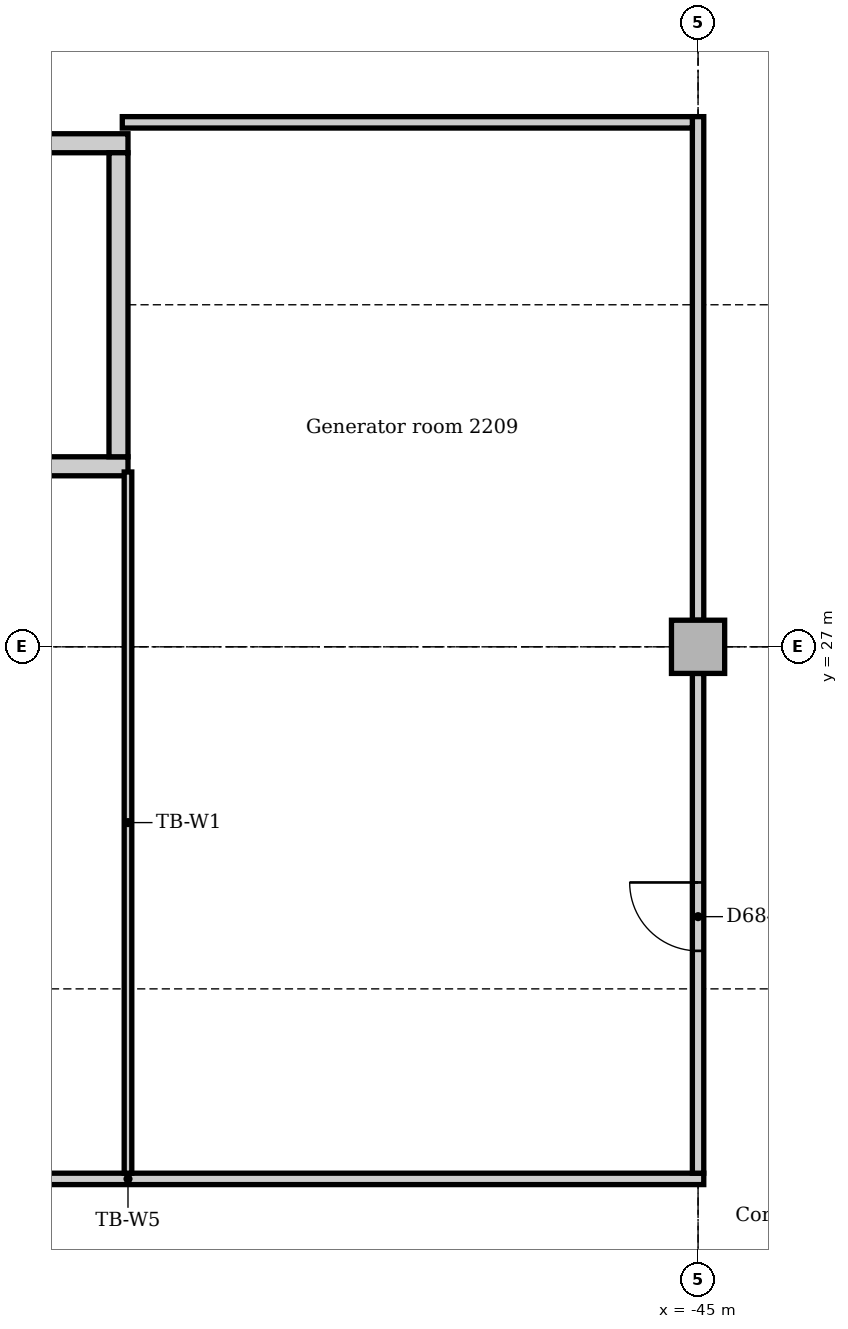
"""IFC4 building model, lengths in metres.
Left out: names, types, materials, properties, quantities, classifications, styles, units other than length and angle.
Written with IfcOpenShell. Run it as: python <this file> out.ifc"""

import sys

from ifc_helpers import new_model, si_unit, direction, frame, frame_2d, origin, origin_2d, place, context, subcontext, project, spatial, rectangle, extrude, element, fill, save


model = new_model("IFC4")
c1 = context("Model", 3, precision=1e-05, world=origin(), true_north=direction((0.0, 1.0)))
c2 = subcontext(c1, "Body", "Model", "MODEL_VIEW")
j1 = project(units=[si_unit("LENGTHUNIT", "METRE"), si_unit("PLANEANGLEUNIT", "RADIAN")], contexts=[c1])
p1 = place(None, origin())
s1 = spatial("IfcSite", under=j1, at=p1, CompositionType="ELEMENT")
p2 = place(p1, origin())
s2 = spatial("IfcBuilding", under=s1, at=p2, CompositionType="ELEMENT")
p3 = place(p2, frame((0.0, 0.0, 95.0)))
s3 = spatial("IfcBuildingStorey", under=s2, at=p3, CompositionType="ELEMENT", Elevation=95.0)
p4 = place(p3, frame((-60.0, 29.375, 0.0), z_axis=(0.0, 0.0, 1.0), x_axis=(1.0, 0.0, 0.0)))
e1 = element("IfcWall", 1, at=p4, inside=s3, PredefinedType="SOLIDWALL", context=c2, shape_type="SweptSolid", body=[
    extrude(rectangle(XDim=7.5, YDim=0.25, at=frame_2d((3.75, 0.0))), origin(), (0.0, 0.0, 1.0), 5.0),
])
p5 = place(p3, frame((-52.5, 33.625, 0.0), z_axis=(0.0, 0.0, 1.0), x_axis=(-1.0, 0.0, 0.0)))
e2 = element("IfcWall", 2, at=p5, inside=s3, PredefinedType="SOLIDWALL", context=c2, shape_type="SweptSolid", body=[
    extrude(rectangle(XDim=7.5, YDim=0.25, at=frame_2d((3.75, 0.0))), origin(), (0.0, 0.0, 1.0), 5.0),
])
p6 = place(p5, frame((6.0, 0.0, 0.0)))
e3 = element("IfcOpeningElement", 3, at=p6, cuts=e2, PredefinedType="OPENING", context=c2, shape_type="SweptSolid", body=[
    extrude(rectangle(XDim=1.0, YDim=2.1, at=frame_2d((0.5, 1.05))), frame((0.0, 0.135, 0.0), z_axis=(0.0, -1.0, 0.0), x_axis=(1.0, 0.0, 0.0)), (0.0, 0.0, 1.0), 0.27),
])
p7 = place(p3, frame((-52.625, 29.5, 0.0), z_axis=(0.0, 0.0, 1.0), x_axis=(0.0, 1.0, 0.0)))
e4 = element("IfcWall", 4, at=p7, inside=s3, PredefinedType="SOLIDWALL", context=c2, shape_type="SweptSolid", body=[
    extrude(rectangle(XDim=4.0, YDim=0.25, at=frame_2d((2.0, 0.0))), origin(), (0.0, 0.0, 1.0), 5.0),
])
p8 = place(p3, frame((-45.0, 27.0, 0.0), z_axis=(0.0, 0.0, 1.0), x_axis=(1.0, 0.0, 0.0)))
e5 = element("IfcColumn", 5, at=p8, inside=s3, PredefinedType="COLUMN", context=c2, shape_type="SweptSolid", body=[
    extrude(rectangle(XDim=0.7, YDim=0.7, at=origin_2d()), origin(), (0.0, 0.0, 1.0), 4.85),
])
p9 = place(p3, frame((-60.075, 20.0, 0.0), z_axis=(0.0, 0.0, 1.0), x_axis=(1.0, 0.0, 0.0)))
e6 = element("IfcWall", 6, at=p9, inside=s3, PredefinedType="PARTITIONING", context=c2, shape_type="SweptSolid", body=[
    extrude(rectangle(XDim=15.15, YDim=0.15, at=frame_2d((7.575, 0.0))), origin(), (0.0, 0.0, 1.0), 4.85),
])
p10 = place(p9, frame((3.4, 0.0, 0.0)))
e7 = element("IfcOpeningElement", 7, at=p10, cuts=e6, PredefinedType="OPENING", context=c2, shape_type="SweptSolid", body=[
    extrude(rectangle(XDim=0.9, YDim=2.1, at=frame_2d((0.45, 1.05))), frame((0.0, 0.085, 0.0), z_axis=(0.0, -1.0, 0.0), x_axis=(1.0, 0.0, 0.0)), (0.0, 0.0, 1.0), 0.17),
])
p11 = place(p3, frame((-45.0, 20.075, 0.0), z_axis=(0.0, 0.0, 1.0), x_axis=(0.0, 1.0, 0.0)))
e8 = element("IfcWall", 8, at=p11, inside=s3, PredefinedType="PARTITIONING", context=c2, shape_type="SweptSolid", body=[
    extrude(rectangle(XDim=6.575, YDim=0.15, at=frame_2d((3.288, 0.0))), origin(), (0.0, 0.0, 1.0), 4.362),
])
p12 = place(p11, frame((2.925, 0.0, 0.0)))
e9 = element("IfcOpeningElement", 9, at=p12, cuts=e8, PredefinedType="OPENING", context=c2, shape_type="SweptSolid", body=[
    extrude(rectangle(XDim=0.9, YDim=2.1, at=frame_2d((0.45, 1.05))), frame((0.0, 0.085, 0.0), z_axis=(0.0, -1.0, 0.0), x_axis=(1.0, 0.0, 0.0)), (0.0, 0.0, 1.0), 0.17),
])
p13 = place(p3, frame((-45.0, 27.35, 0.0), z_axis=(0.0, 0.0, 1.0), x_axis=(0.0, 1.0, 0.0)))
e10 = element("IfcWall", 10, at=p13, inside=s3, PredefinedType="PARTITIONING", context=c2, shape_type="SweptSolid", body=[
    extrude(rectangle(XDim=6.625, YDim=0.15, at=frame_2d((3.312, 0.0))), origin(), (0.0, 0.0, 1.0), 4.362),
])
p14 = place(p3, frame((-52.575, 33.9, 0.0), z_axis=(0.0, 0.0, 1.0), x_axis=(1.0, 0.0, 0.0)))
e11 = element("IfcWall", 11, at=p14, inside=s3, PredefinedType="PARTITIONING", context=c2, shape_type="SweptSolid", body=[
    extrude(rectangle(XDim=7.5, YDim=0.15, at=frame_2d((3.75, 0.0))), origin(), (0.0, 0.0, 1.0), 4.85),
])
p15 = place(p3, frame((-52.5, 20.075, 0.0), z_axis=(0.0, 0.0, 1.0), x_axis=(0.0, 1.0, 0.0)))
e12 = element("IfcWall", 12, at=p15, inside=s3, PredefinedType="PARTITIONING", context=c2, shape_type="SweptSolid", body=[
    extrude(rectangle(XDim=9.225, YDim=0.1, at=frame_2d((4.612, 0.0))), origin(), (0.0, 0.0, 1.0), 4.85),
])
p16 = place(p12, origin())
e13 = element("IfcDoor", 13, at=p16, inside=s3, OperationType="SINGLE_SWING_RIGHT", PredefinedType="DOOR", context=c2, shape_type="SweptSolid", body=[
    extrude(rectangle(XDim=0.9, YDim=2.1, at=frame_2d((0.45, 1.05))), frame((0.0, 0.025, 0.0), z_axis=(0.0, -1.0, 0.0), x_axis=(1.0, 0.0, 0.0)), (0.0, 0.0, 1.0), 0.05),
])
fill(e9, e13)
save(model, sys.argv[1])
